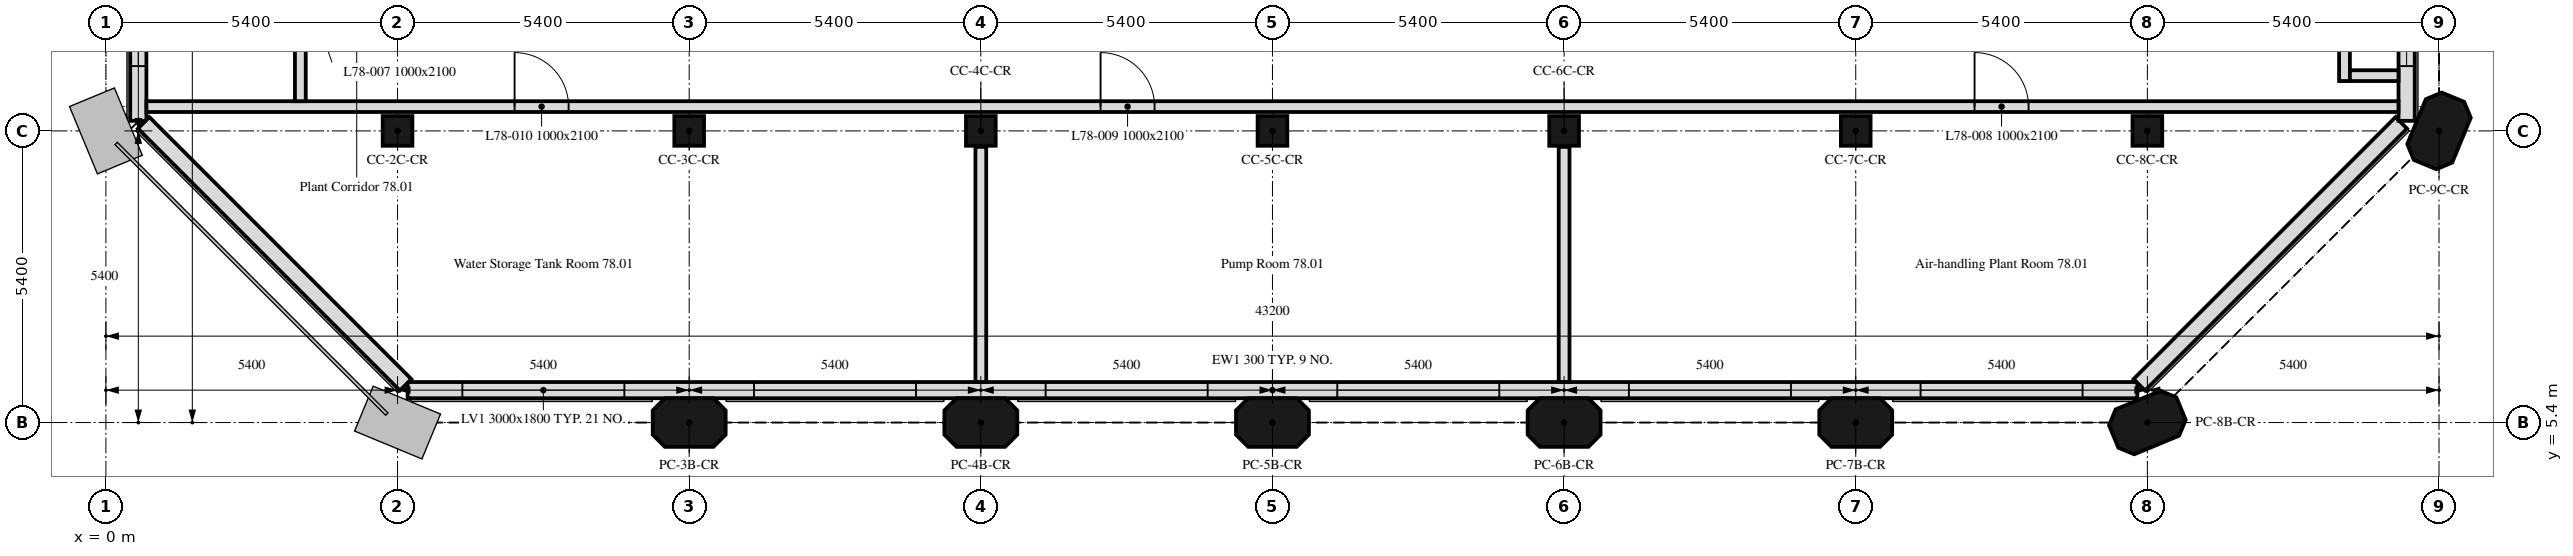
"""IFC4 building model, lengths in metres.
Left out: names, types, materials, properties, quantities, classifications, styles, units other than length and angle.
Written with IfcOpenShell. Run it as: python <this file> out.ifc"""

import sys

from ifc_helpers import new_model, si_unit, direction, frame, frame_2d, origin, origin_2d, place, context, subcontext, project, spatial, polyline, rectangle, outline, extrude, element, fill, save


model = new_model("IFC4")
c1 = context("Model", 3, precision=1e-05, world=origin(), true_north=direction((0.0, 1.0)))
c2 = subcontext(c1, "Body", "Model", "MODEL_VIEW")
j1 = project(units=[si_unit("LENGTHUNIT", "METRE"), si_unit("PLANEANGLEUNIT", "RADIAN")], contexts=[c1])
p1 = place(None, origin())
s1 = spatial("IfcSite", under=j1, at=p1, CompositionType="ELEMENT")
p2 = place(p1, origin())
s2 = spatial("IfcBuilding", under=s1, at=p2, CompositionType="ELEMENT")
p3 = place(p2, frame((0.0, 0.0, 312.7)))
s3 = spatial("IfcBuildingStorey", under=s2, at=p3, CompositionType="ELEMENT", Elevation=312.7)
for number, where, z_axis, x_axis in (
    (1, (10.8, 5.4, 0.0), (0.0, 0.0, 1.0), (1.0, 0.0, 0.0)),
    (2, (16.2, 5.4, 0.0), (0.0, 0.0, 1.0), (1.0, 0.0, 0.0)),
    (3, (21.6, 5.4, 0.0), (0.0, 0.0, 1.0), (1.0, 0.0, 0.0)),
    (4, (27.0, 5.4, 0.0), (0.0, 0.0, 1.0), (1.0, 0.0, 0.0)),
    (5, (32.4, 5.4, 0.0), (0.0, 0.0, 1.0), (1.0, 0.0, 0.0)),
    (6, (37.8, 5.4, 0.0), (0.0, 0.0, 1.0), (0.924, 0.383, 0.0)),
):
    element("IfcColumn", number, at=place(p3, frame(where, z_axis=z_axis, x_axis=x_axis)), inside=s3, PredefinedType="COLUMN", context=c2, shape_type="SweptSolid", body=[
        extrude(outline(polyline([(-0.45, -0.45), (0.45, -0.45), (0.675, -0.225), (0.675, 0.225), (0.45, 0.45), (-0.45, 0.45), (-0.675, 0.225), (-0.675, -0.225), (-0.45, -0.45)])), origin(), (0.0, 0.0, 1.0), 4.2),
    ])
for number, where, z_axis, x_axis in (
    (7, (5.4, 10.8, 0.0), (0.0, 0.0, 1.0), (1.0, 0.0, 0.0)),
    (8, (10.8, 10.8, 0.0), (0.0, 0.0, 1.0), (1.0, 0.0, 0.0)),
    (9, (16.2, 10.8, 0.0), (0.0, 0.0, 1.0), (1.0, 0.0, 0.0)),
    (10, (21.6, 10.8, 0.0), (0.0, 0.0, 1.0), (1.0, 0.0, 0.0)),
    (11, (27.0, 10.8, 0.0), (0.0, 0.0, 1.0), (1.0, 0.0, 0.0)),
    (12, (32.4, 10.8, 0.0), (0.0, 0.0, 1.0), (1.0, 0.0, 0.0)),
    (13, (37.8, 10.8, 0.0), (0.0, 0.0, 1.0), (1.0, 0.0, 0.0)),
):
    element("IfcColumn", number, at=place(p3, frame(where, z_axis=z_axis, x_axis=x_axis)), inside=s3, PredefinedType="COLUMN", context=c2, shape_type="SweptSolid", body=[
        extrude(rectangle(XDim=0.55, YDim=0.55, at=origin_2d()), origin(), (0.0, 0.0, 1.0), 4.2),
    ])
p4 = place(p3, frame((43.2, 10.8, 0.0), z_axis=(0.0, 0.0, 1.0), x_axis=(0.382683432365, 0.923879532511, 0.0)))
e14 = element("IfcColumn", 14, at=p4, inside=s3, PredefinedType="COLUMN", context=c2, shape_type="SweptSolid", body=[
    extrude(outline(polyline([(-0.45, -0.45), (0.45, -0.45), (0.675, -0.225), (0.675, 0.225), (0.45, 0.45), (-0.45, 0.45), (-0.675, 0.225), (-0.675, -0.225), (-0.45, -0.45)])), origin(), (0.0, 0.0, 1.0), 4.2),
])
p5 = place(p3, frame((5.586, 6.0, 0.0), z_axis=(0.0, 0.0, 1.0), x_axis=(1.0, 0.0, 0.0)))
e15 = element("IfcWall", 15, at=p5, inside=s3, PredefinedType="SOLIDWALL", context=c2, shape_type="SweptSolid", body=[
    extrude(outline(polyline([(0.0, 0.0), (32.027, 0.0), (32.027, 4.2), (31.434, 4.2), (30.841, 4.2), (30.248, 4.2), (29.655, 4.2), (29.062, 4.2), (28.469, 4.2), (27.875, 4.2), (27.282, 4.2), (26.689, 4.2), (26.096, 4.2), (25.503, 4.2), (24.91, 4.2), (24.317, 4.2), (23.724, 4.2), (23.131, 4.2), (22.538, 4.2), (21.945, 4.2), (21.352, 4.2), (20.758, 4.2), (20.165, 4.2), (19.572, 4.2), (18.979, 4.2), (18.386, 4.2), (17.793, 4.2), (17.2, 4.2), (16.607, 4.2), (16.014, 4.2), (15.42, 4.2), (14.827, 4.2), (14.234, 4.2), (13.641, 4.2), (13.048, 4.2), (12.455, 4.2), (11.862, 4.2), (11.269, 4.2), (10.676, 4.2), (10.083, 4.2), (9.49, 4.2), (8.896, 4.2), (8.303, 4.2), (7.71, 4.2), (7.117, 4.2), (6.524, 4.2), (5.931, 4.2), (5.338, 4.2), (4.745, 4.2), (4.152, 4.2), (3.559, 4.2), (2.966, 4.2), (2.372, 4.2), (1.779, 4.2), (1.186, 4.2), (0.593, 4.2), (0.0, 4.2), (0.0, 0.0)])), frame((0.0, 0.15, 0.0), z_axis=(0.0, -1.0, 0.0), x_axis=(1.0, 0.0, 0.0)), (0.0, 0.0, 1.0), 0.3),
])
p6 = place(p5, frame((1.014, 0.0, 0.6)))
e16 = element("IfcOpeningElement", 16, at=p6, cuts=e15, PredefinedType="OPENING", context=c2, shape_type="SweptSolid", body=[
    extrude(rectangle(XDim=3.0, YDim=1.8, at=frame_2d((1.5, 0.9))), frame((0.0, 0.16, 0.0), z_axis=(0.0, -1.0, 0.0), x_axis=(1.0, 0.0, 0.0)), (0.0, 0.0, 1.0), 0.32),
])
p7 = place(p5, frame((6.414, 0.0, 0.6)))
e17 = element("IfcOpeningElement", 17, at=p7, cuts=e15, PredefinedType="OPENING", context=c2, shape_type="SweptSolid", body=[
    extrude(rectangle(XDim=3.0, YDim=1.8, at=frame_2d((1.5, 0.9))), frame((0.0, 0.16, 0.0), z_axis=(0.0, -1.0, 0.0), x_axis=(1.0, 0.0, 0.0)), (0.0, 0.0, 1.0), 0.32),
])
p8 = place(p5, frame((11.814, 0.0, 0.6)))
e18 = element("IfcOpeningElement", 18, at=p8, cuts=e15, PredefinedType="OPENING", context=c2, shape_type="SweptSolid", body=[
    extrude(rectangle(XDim=3.0, YDim=1.8, at=frame_2d((1.5, 0.9))), frame((0.0, 0.16, 0.0), z_axis=(0.0, -1.0, 0.0), x_axis=(1.0, 0.0, 0.0)), (0.0, 0.0, 1.0), 0.32),
])
p9 = place(p5, frame((17.214, 0.0, 0.6)))
e19 = element("IfcOpeningElement", 19, at=p9, cuts=e15, PredefinedType="OPENING", context=c2, shape_type="SweptSolid", body=[
    extrude(rectangle(XDim=3.0, YDim=1.8, at=frame_2d((1.5, 0.9))), frame((0.0, 0.16, 0.0), z_axis=(0.0, -1.0, 0.0), x_axis=(1.0, 0.0, 0.0)), (0.0, 0.0, 1.0), 0.32),
])
p10 = place(p5, frame((22.614, 0.0, 0.6)))
e20 = element("IfcOpeningElement", 20, at=p10, cuts=e15, PredefinedType="OPENING", context=c2, shape_type="SweptSolid", body=[
    extrude(rectangle(XDim=3.0, YDim=1.8, at=frame_2d((1.5, 0.9))), frame((0.0, 0.16, 0.0), z_axis=(0.0, -1.0, 0.0), x_axis=(1.0, 0.0, 0.0)), (0.0, 0.0, 1.0), 0.32),
])
p11 = place(p5, frame((28.014, 0.0, 0.6)))
e21 = element("IfcOpeningElement", 21, at=p11, cuts=e15, PredefinedType="OPENING", context=c2, shape_type="SweptSolid", body=[
    extrude(rectangle(XDim=3.0, YDim=1.8, at=frame_2d((1.5, 0.9))), frame((0.0, 0.16, 0.0), z_axis=(0.0, -1.0, 0.0), x_axis=(1.0, 0.0, 0.0)), (0.0, 0.0, 1.0), 0.32),
])
p12 = place(p3, frame((37.65, 6.099, 0.0), z_axis=(0.0, 0.0, 1.0), x_axis=(0.707106781187, 0.707106781187, 0.0)))
e22 = element("IfcWall", 22, at=p12, inside=s3, PredefinedType="SOLIDWALL", context=c2, shape_type="SweptSolid", body=[
    extrude(outline(polyline([(0.0, 0.0), (6.86, 0.0), (6.86, 4.2), (6.288, 4.2), (5.716, 4.2), (5.145, 4.2), (4.573, 4.2), (4.001, 4.2), (3.43, 4.2), (2.858, 4.2), (2.287, 4.2), (1.715, 4.2), (1.143, 4.2), (0.572, 4.2), (0.0, 4.2), (0.0, 0.0)])), frame((0.0, 0.15, 0.0), z_axis=(0.0, -1.0, 0.0), x_axis=(1.0, 0.0, 0.0)), (0.0, 0.0, 1.0), 0.3),
])
p13 = place(p3, frame((42.6, 10.986, 0.0), z_axis=(0.0, 0.0, 1.0), x_axis=(0.0, 1.0, 0.0)))
e23 = element("IfcWall", 23, at=p13, inside=s3, PredefinedType="SOLIDWALL", context=c2, shape_type="SweptSolid", body=[
    extrude(outline(polyline([(0.0, 0.0), (5.214, 0.0), (5.214, 4.2), (4.634, 4.2), (4.055, 4.2), (3.476, 4.2), (2.896, 4.2), (2.317, 4.2), (1.738, 4.2), (1.159, 4.2), (0.579, 4.2), (0.0, 4.2), (0.0, 0.0)])), frame((0.0, 0.15, 0.0), z_axis=(0.0, -1.0, 0.0), x_axis=(1.0, 0.0, 0.0)), (0.0, 0.0, 1.0), 0.3),
])
p14 = place(p13, frame((1.014, 0.0, 0.6)))
e24 = element("IfcOpeningElement", 24, at=p14, cuts=e23, PredefinedType="OPENING", context=c2, shape_type="SweptSolid", body=[
    extrude(rectangle(XDim=3.0, YDim=1.8, at=frame_2d((1.5, 0.9))), frame((0.0, 0.16, 0.0), z_axis=(0.0, -1.0, 0.0), x_axis=(1.0, 0.0, 0.0)), (0.0, 0.0, 1.0), 0.32),
])
p15 = place(p3, frame((0.6, 43.014, 0.0), z_axis=(0.0, 0.0, 1.0), x_axis=(0.0, -1.0, 0.0)))
e25 = element("IfcWall", 25, at=p15, inside=s3, PredefinedType="SOLIDWALL", context=c2, shape_type="SweptSolid", body=[
    extrude(outline(polyline([(0.0, 0.0), (32.027, 0.0), (32.027, 4.2), (31.434, 4.2), (30.841, 4.2), (30.248, 4.2), (29.655, 4.2), (29.062, 4.2), (28.469, 4.2), (27.875, 4.2), (27.282, 4.2), (26.689, 4.2), (26.096, 4.2), (25.503, 4.2), (24.91, 4.2), (24.317, 4.2), (23.724, 4.2), (23.131, 4.2), (22.538, 4.2), (21.945, 4.2), (21.352, 4.2), (20.758, 4.2), (20.165, 4.2), (19.572, 4.2), (18.979, 4.2), (18.386, 4.2), (17.793, 4.2), (17.2, 4.2), (16.607, 4.2), (16.014, 4.2), (15.42, 4.2), (14.827, 4.2), (14.234, 4.2), (13.641, 4.2), (13.048, 4.2), (12.455, 4.2), (11.862, 4.2), (11.269, 4.2), (10.676, 4.2), (10.083, 4.2), (9.49, 4.2), (8.896, 4.2), (8.303, 4.2), (7.71, 4.2), (7.117, 4.2), (6.524, 4.2), (5.931, 4.2), (5.338, 4.2), (4.745, 4.2), (4.152, 4.2), (3.559, 4.2), (2.966, 4.2), (2.372, 4.2), (1.779, 4.2), (1.186, 4.2), (0.593, 4.2), (0.0, 4.2), (0.0, 0.0)])), frame((0.0, 0.15, 0.0), z_axis=(0.0, -1.0, 0.0), x_axis=(1.0, 0.0, 0.0)), (0.0, 0.0, 1.0), 0.3),
])
p16 = place(p15, frame((1.014, 0.0, 0.6)))
e26 = element("IfcOpeningElement", 26, at=p16, cuts=e25, PredefinedType="OPENING", context=c2, shape_type="SweptSolid", body=[
    extrude(rectangle(XDim=3.0, YDim=1.8, at=frame_2d((1.5, 0.9))), frame((0.0, 0.16, 0.0), z_axis=(0.0, -1.0, 0.0), x_axis=(1.0, 0.0, 0.0)), (0.0, 0.0, 1.0), 0.32),
])
p17 = place(p15, frame((6.414, 0.0, 0.6)))
e27 = element("IfcOpeningElement", 27, at=p17, cuts=e25, PredefinedType="OPENING", context=c2, shape_type="SweptSolid", body=[
    extrude(rectangle(XDim=3.0, YDim=1.8, at=frame_2d((1.5, 0.9))), frame((0.0, 0.16, 0.0), z_axis=(0.0, -1.0, 0.0), x_axis=(1.0, 0.0, 0.0)), (0.0, 0.0, 1.0), 0.32),
])
p18 = place(p15, frame((11.814, 0.0, 0.6)))
e28 = element("IfcOpeningElement", 28, at=p18, cuts=e25, PredefinedType="OPENING", context=c2, shape_type="SweptSolid", body=[
    extrude(rectangle(XDim=3.0, YDim=1.8, at=frame_2d((1.5, 0.9))), frame((0.0, 0.16, 0.0), z_axis=(0.0, -1.0, 0.0), x_axis=(1.0, 0.0, 0.0)), (0.0, 0.0, 1.0), 0.32),
])
p19 = place(p15, frame((17.214, 0.0, 0.6)))
e29 = element("IfcOpeningElement", 29, at=p19, cuts=e25, PredefinedType="OPENING", context=c2, shape_type="SweptSolid", body=[
    extrude(rectangle(XDim=3.0, YDim=1.8, at=frame_2d((1.5, 0.9))), frame((0.0, 0.16, 0.0), z_axis=(0.0, -1.0, 0.0), x_axis=(1.0, 0.0, 0.0)), (0.0, 0.0, 1.0), 0.32),
])
p20 = place(p15, frame((22.614, 0.0, 0.6)))
e30 = element("IfcOpeningElement", 30, at=p20, cuts=e25, PredefinedType="OPENING", context=c2, shape_type="SweptSolid", body=[
    extrude(rectangle(XDim=3.0, YDim=1.8, at=frame_2d((1.5, 0.9))), frame((0.0, 0.16, 0.0), z_axis=(0.0, -1.0, 0.0), x_axis=(1.0, 0.0, 0.0)), (0.0, 0.0, 1.0), 0.32),
])
p21 = place(p15, frame((28.014, 0.0, 0.6)))
e31 = element("IfcOpeningElement", 31, at=p21, cuts=e25, PredefinedType="OPENING", context=c2, shape_type="SweptSolid", body=[
    extrude(rectangle(XDim=3.0, YDim=1.8, at=frame_2d((1.5, 0.9))), frame((0.0, 0.16, 0.0), z_axis=(0.0, -1.0, 0.0), x_axis=(1.0, 0.0, 0.0)), (0.0, 0.0, 1.0), 0.32),
])
p22 = place(p3, frame((0.699, 10.949, 0.0), z_axis=(0.0, 0.0, 1.0), x_axis=(0.707106781187, -0.707106781187, 0.0)))
e32 = element("IfcWall", 32, at=p22, inside=s3, PredefinedType="SOLIDWALL", context=c2, shape_type="SweptSolid", body=[
    extrude(outline(polyline([(0.0, 0.0), (6.86, 0.0), (6.86, 4.2), (6.288, 4.2), (5.716, 4.2), (5.145, 4.2), (4.573, 4.2), (4.001, 4.2), (3.43, 4.2), (2.858, 4.2), (2.287, 4.2), (1.715, 4.2), (1.143, 4.2), (0.572, 4.2), (0.0, 4.2), (0.0, 0.0)])), frame((0.0, 0.15, 0.0), z_axis=(0.0, -1.0, 0.0), x_axis=(1.0, 0.0, 0.0)), (0.0, 0.0, 1.0), 0.3),
])
for number, where, z_axis, x_axis in (
    (33, (27.0, 10.505, 0.0), (0.0, 0.0, 1.0), (0.0, -1.0, 0.0)),
    (34, (16.2, 10.505, 0.0), (0.0, 0.0, 1.0), (0.0, -1.0, 0.0)),
):
    element("IfcWall", number, at=place(p3, frame(where, z_axis=z_axis, x_axis=x_axis)), inside=s3, PredefinedType="PARTITIONING", context=c2, shape_type="SweptSolid", body=[
        extrude(rectangle(XDim=4.354, YDim=0.2, at=frame_2d((2.177, 0.0))), origin(), (0.0, 0.0, 1.0), 4.2),
    ])
p23 = place(p3, frame((0.751, 11.25, 0.0), z_axis=(0.0, 0.0, 1.0), x_axis=(1.0, 0.0, 0.0)))
e35 = element("IfcWall", 35, at=p23, inside=s3, PredefinedType="PARTITIONING", context=c2, shape_type="SweptSolid", body=[
    extrude(rectangle(XDim=41.698, YDim=0.2, at=frame_2d((20.849, 0.0))), origin(), (0.0, 0.0, 1.0), 4.2),
])
p24 = place(p23, frame((33.849, 0.0, 0.0)))
e36 = element("IfcOpeningElement", 36, at=p24, cuts=e35, PredefinedType="OPENING", context=c2, shape_type="SweptSolid", body=[
    extrude(rectangle(XDim=1.0, YDim=2.1, at=frame_2d((0.5, 1.05))), frame((0.0, 0.1, 0.0), z_axis=(0.0, -1.0, 0.0), x_axis=(1.0, 0.0, 0.0)), (0.0, 0.0, 1.0), 0.2),
])
p25 = place(p23, frame((17.666, 0.0, 0.0)))
e37 = element("IfcOpeningElement", 37, at=p25, cuts=e35, PredefinedType="OPENING", context=c2, shape_type="SweptSolid", body=[
    extrude(rectangle(XDim=1.0, YDim=2.1, at=frame_2d((0.5, 1.05))), frame((0.0, 0.1, 0.0), z_axis=(0.0, -1.0, 0.0), x_axis=(1.0, 0.0, 0.0)), (0.0, 0.0, 1.0), 0.2),
])
p26 = place(p23, frame((6.816, 0.0, 0.0)))
e38 = element("IfcOpeningElement", 38, at=p26, cuts=e35, PredefinedType="OPENING", context=c2, shape_type="SweptSolid", body=[
    extrude(rectangle(XDim=1.0, YDim=2.1, at=frame_2d((0.5, 1.05))), frame((0.0, 0.1, 0.0), z_axis=(0.0, -1.0, 0.0), x_axis=(1.0, 0.0, 0.0)), (0.0, 0.0, 1.0), 0.2),
])
p27 = place(p3, frame((3.6, 11.35, 0.0), z_axis=(0.0, 0.0, 1.0), x_axis=(0.0, 1.0, 0.0)))
e39 = element("IfcWall", 39, at=p27, inside=s3, PredefinedType="PARTITIONING", context=c2, shape_type="SweptSolid", body=[
    extrude(rectangle(XDim=31.3, YDim=0.2, at=frame_2d((15.65, 0.0))), origin(), (0.0, 0.0, 1.0), 3.45),
])
p28 = place(p27, frame((23.537, 0.0, 0.0)))
e40 = element("IfcOpeningElement", 40, at=p28, cuts=e39, PredefinedType="OPENING", context=c2, shape_type="SweptSolid", body=[
    extrude(rectangle(XDim=1.0, YDim=2.1, at=frame_2d((0.5, 1.05))), frame((0.0, 0.1, 0.0), z_axis=(0.0, -1.0, 0.0), x_axis=(1.0, 0.0, 0.0)), (0.0, 0.0, 1.0), 0.2),
])
p29 = place(p27, frame((17.85, 0.0, 0.0)))
e41 = element("IfcOpeningElement", 41, at=p29, cuts=e39, PredefinedType="OPENING", context=c2, shape_type="SweptSolid", body=[
    extrude(rectangle(XDim=1.0, YDim=2.1, at=frame_2d((0.5, 1.05))), frame((0.0, 0.1, 0.0), z_axis=(0.0, -1.0, 0.0), x_axis=(1.0, 0.0, 0.0)), (0.0, 0.0, 1.0), 0.2),
])
p30 = place(p27, frame((1.875, 0.0, 0.0)))
e42 = element("IfcOpeningElement", 42, at=p30, cuts=e39, PredefinedType="OPENING", context=c2, shape_type="SweptSolid", body=[
    extrude(rectangle(XDim=1.0, YDim=2.1, at=frame_2d((0.5, 1.05))), frame((0.0, 0.1, 0.0), z_axis=(0.0, -1.0, 0.0), x_axis=(1.0, 0.0, 0.0)), (0.0, 0.0, 1.0), 0.2),
])
p31 = place(p27, frame((9.75, 0.0, 0.0)))
e43 = element("IfcOpeningElement", 43, at=p31, cuts=e39, PredefinedType="OPENING", context=c2, shape_type="SweptSolid", body=[
    extrude(rectangle(XDim=1.0, YDim=2.1, at=frame_2d((0.5, 1.05))), frame((0.0, 0.1, 0.0), z_axis=(0.0, -1.0, 0.0), x_axis=(1.0, 0.0, 0.0)), (0.0, 0.0, 1.0), 0.2),
])
p32 = place(p3, frame((41.449, 13.15, 0.0), z_axis=(0.0, 0.0, 1.0), x_axis=(0.00085543168, -0.999999634118, 0.0)))
e44 = element("IfcWall", 44, at=p32, inside=s3, PredefinedType="PARTITIONING", context=c2, shape_type="SweptSolid", body=[
    extrude(rectangle(XDim=1.427, YDim=0.2, at=frame_2d((0.713, 0.0))), origin(), (0.0, 0.0, 1.0), 4.2),
])
p33 = place(p3, frame((41.55, 11.823, 0.0), z_axis=(0.0, 0.0, 1.0), x_axis=(1.0, 0.0, 0.0)))
e45 = element("IfcWall", 45, at=p33, inside=s3, PredefinedType="PARTITIONING", context=c2, shape_type="SweptSolid", body=[
    extrude(rectangle(XDim=0.9, YDim=0.2, at=frame_2d((0.45, 0.0))), origin(), (0.0, 0.0, 1.0), 4.2),
])
p34 = place(p6, origin())
e46 = element("IfcWindow", 46, at=p34, inside=s3, PartitioningType="SINGLE_PANEL", PredefinedType="WINDOW", context=c2, shape_type="SweptSolid", body=[
    extrude(rectangle(XDim=3.0, YDim=1.8, at=frame_2d((1.5, 0.9))), frame((0.0, 0.03, 0.0), z_axis=(0.0, -1.0, 0.0), x_axis=(1.0, 0.0, 0.0)), (0.0, 0.0, 1.0), 0.06),
])
fill(e16, e46)
p35 = place(p7, origin())
e47 = element("IfcWindow", 47, at=p35, inside=s3, PartitioningType="SINGLE_PANEL", PredefinedType="WINDOW", context=c2, shape_type="SweptSolid", body=[
    extrude(rectangle(XDim=3.0, YDim=1.8, at=frame_2d((1.5, 0.9))), frame((0.0, 0.03, 0.0), z_axis=(0.0, -1.0, 0.0), x_axis=(1.0, 0.0, 0.0)), (0.0, 0.0, 1.0), 0.06),
])
fill(e17, e47)
p36 = place(p8, origin())
e48 = element("IfcWindow", 48, at=p36, inside=s3, PartitioningType="SINGLE_PANEL", PredefinedType="WINDOW", context=c2, shape_type="SweptSolid", body=[
    extrude(rectangle(XDim=3.0, YDim=1.8, at=frame_2d((1.5, 0.9))), frame((0.0, 0.03, 0.0), z_axis=(0.0, -1.0, 0.0), x_axis=(1.0, 0.0, 0.0)), (0.0, 0.0, 1.0), 0.06),
])
fill(e18, e48)
p37 = place(p9, origin())
e49 = element("IfcWindow", 49, at=p37, inside=s3, PartitioningType="SINGLE_PANEL", PredefinedType="WINDOW", context=c2, shape_type="SweptSolid", body=[
    extrude(rectangle(XDim=3.0, YDim=1.8, at=frame_2d((1.5, 0.9))), frame((0.0, 0.03, 0.0), z_axis=(0.0, -1.0, 0.0), x_axis=(1.0, 0.0, 0.0)), (0.0, 0.0, 1.0), 0.06),
])
fill(e19, e49)
p38 = place(p10, origin())
e50 = element("IfcWindow", 50, at=p38, inside=s3, PartitioningType="SINGLE_PANEL", PredefinedType="WINDOW", context=c2, shape_type="SweptSolid", body=[
    extrude(rectangle(XDim=3.0, YDim=1.8, at=frame_2d((1.5, 0.9))), frame((0.0, 0.03, 0.0), z_axis=(0.0, -1.0, 0.0), x_axis=(1.0, 0.0, 0.0)), (0.0, 0.0, 1.0), 0.06),
])
fill(e20, e50)
p39 = place(p11, origin())
e51 = element("IfcWindow", 51, at=p39, inside=s3, PartitioningType="SINGLE_PANEL", PredefinedType="WINDOW", context=c2, shape_type="SweptSolid", body=[
    extrude(rectangle(XDim=3.0, YDim=1.8, at=frame_2d((1.5, 0.9))), frame((0.0, 0.03, 0.0), z_axis=(0.0, -1.0, 0.0), x_axis=(1.0, 0.0, 0.0)), (0.0, 0.0, 1.0), 0.06),
])
fill(e21, e51)
p40 = place(p14, origin())
e52 = element("IfcWindow", 52, at=p40, inside=s3, PartitioningType="SINGLE_PANEL", PredefinedType="WINDOW", context=c2, shape_type="SweptSolid", body=[
    extrude(rectangle(XDim=3.0, YDim=1.8, at=frame_2d((1.5, 0.9))), frame((0.0, 0.03, 0.0), z_axis=(0.0, -1.0, 0.0), x_axis=(1.0, 0.0, 0.0)), (0.0, 0.0, 1.0), 0.06),
])
fill(e24, e52)
p41 = place(p21, origin())
e53 = element("IfcWindow", 53, at=p41, inside=s3, PartitioningType="SINGLE_PANEL", PredefinedType="WINDOW", context=c2, shape_type="SweptSolid", body=[
    extrude(rectangle(XDim=3.0, YDim=1.8, at=frame_2d((1.5, 0.9))), frame((0.0, 0.03, 0.0), z_axis=(0.0, -1.0, 0.0), x_axis=(1.0, 0.0, 0.0)), (0.0, 0.0, 1.0), 0.06),
])
fill(e31, e53)
p42 = place(p24, origin())
e54 = element("IfcDoor", 54, at=p42, inside=s3, OperationType="SINGLE_SWING_LEFT", PredefinedType="DOOR", context=c2, shape_type="SweptSolid", body=[
    extrude(rectangle(XDim=1.0, YDim=2.1, at=frame_2d((0.5, 1.05))), frame((0.0, 0.025, 0.0), z_axis=(0.0, -1.0, 0.0), x_axis=(1.0, 0.0, 0.0)), (0.0, 0.0, 1.0), 0.05),
])
fill(e36, e54)
p43 = place(p25, origin())
e55 = element("IfcDoor", 55, at=p43, inside=s3, OperationType="SINGLE_SWING_RIGHT", PredefinedType="DOOR", context=c2, shape_type="SweptSolid", body=[
    extrude(rectangle(XDim=1.0, YDim=2.1, at=frame_2d((0.5, 1.05))), frame((0.0, 0.025, 0.0), z_axis=(0.0, -1.0, 0.0), x_axis=(1.0, 0.0, 0.0)), (0.0, 0.0, 1.0), 0.05),
])
fill(e37, e55)
p44 = place(p26, origin())
e56 = element("IfcDoor", 56, at=p44, inside=s3, OperationType="SINGLE_SWING_RIGHT", PredefinedType="DOOR", context=c2, shape_type="SweptSolid", body=[
    extrude(rectangle(XDim=1.0, YDim=2.1, at=frame_2d((0.5, 1.05))), frame((0.0, 0.025, 0.0), z_axis=(0.0, -1.0, 0.0), x_axis=(1.0, 0.0, 0.0)), (0.0, 0.0, 1.0), 0.05),
])
fill(e38, e56)
save(model, sys.argv[1])
